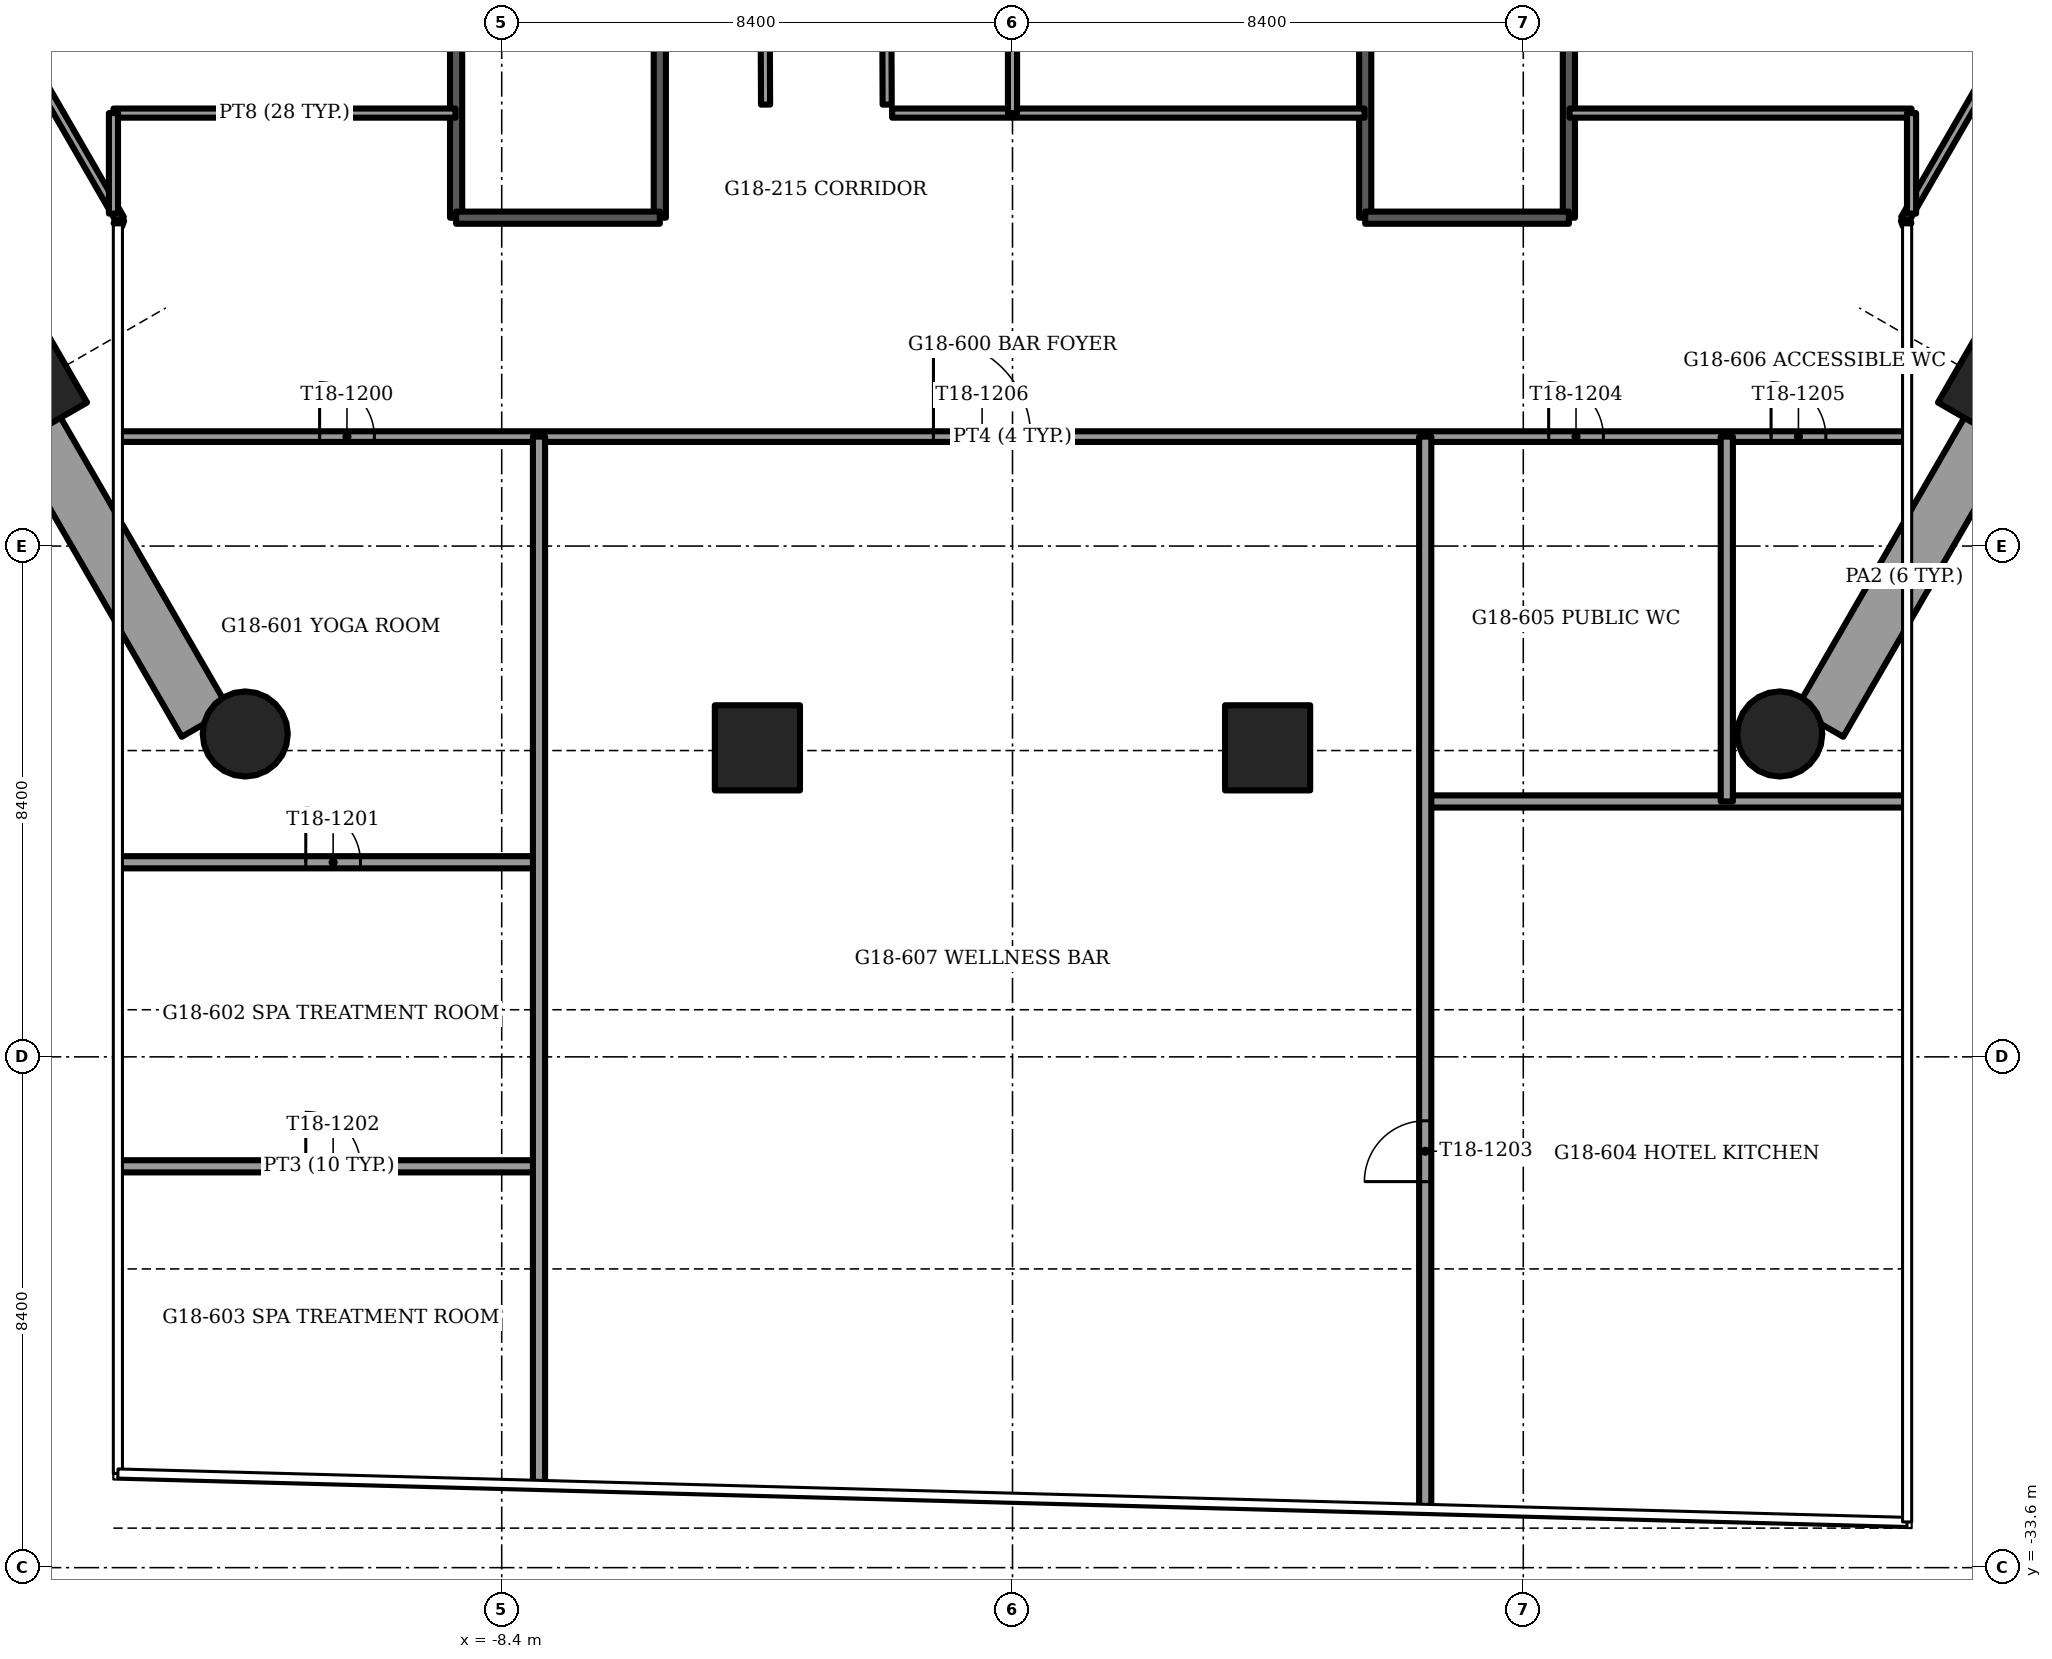
"""IFC4 building model, lengths in metres.
Left out: names, types, materials, properties, quantities, classifications, styles, units other than length and angle.
Written with IfcOpenShell. Run it as: python <this file> out.ifc"""

import sys

from ifc_helpers import new_model, si_unit, direction, frame, frame_2d, origin, origin_2d, place, context, subcontext, project, spatial, rectangle, circle, extrude, element, fill, save


model = new_model("IFC4")
c1 = context("Model", 3, precision=1e-05, world=origin(), true_north=direction((0.0, 1.0)))
c2 = subcontext(c1, "Body", "Model", "MODEL_VIEW")
j1 = project(units=[si_unit("LENGTHUNIT", "METRE"), si_unit("PLANEANGLEUNIT", "RADIAN")], contexts=[c1])
p1 = place(None, origin())
s1 = spatial("IfcSite", under=j1, at=p1, CompositionType="ELEMENT")
p2 = place(p1, origin())
s2 = spatial("IfcBuilding", under=s1, at=p2, CompositionType="ELEMENT")
p3 = place(p2, frame((0.0, 0.0, 73.0)))
s3 = spatial("IfcBuildingStorey", under=s2, at=p3, CompositionType="ELEMENT", Elevation=73.0)
for number, where, z_axis, x_axis in (
    (1, (-12.617, -19.89, -1.2), (0.0, 0.0, 1.0), (1.0, 0.0, 0.0)),
    (2, (12.617, -19.89, -1.2), (0.0, 0.0, 1.0), (1.0, 0.0, 0.0)),
):
    element("IfcColumn", number, at=place(p3, frame(where, z_axis=z_axis, x_axis=x_axis)), inside=s3, PredefinedType="COLUMN", context=c2, shape_type="SweptSolid", body=[
        extrude(circle(Radius=0.7, at=origin_2d()), origin(), (0.0, 0.0, 1.0), 3.75),
    ])
for number, where, z_axis, x_axis in (
    (3, (-16.175, -14.183, -1.2), (0.0, 0.0, 1.0), (-0.5, 0.866, 0.0)),
    (4, (-4.195, -20.118, -1.2), (0.0, 0.0, 1.0), (-1.0, 0.0, 0.0)),
    (5, (4.195, -20.118, -1.2), (0.0, 0.0, 1.0), (-1.0, 0.0, 0.0)),
    (6, (16.175, -14.183, -1.2), (0.0, 0.0, 1.0), (-0.5, -0.866, 0.0)),
):
    element("IfcColumn", number, at=place(p3, frame(where, z_axis=z_axis, x_axis=x_axis)), inside=s3, PredefinedType="COLUMN", context=c2, shape_type="SweptSolid", body=[
        extrude(rectangle(XDim=1.4, YDim=1.4, at=origin_2d()), origin(), (0.0, 0.0, 1.0), 3.75),
    ])
for number, where, z_axis, x_axis in (
    (7, (-16.057, -14.889, 0.0), (0.0, 0.0, 1.0), (0.5, -0.866, 0.0)),
    (8, (13.272, -19.712, 0.0), (0.0, 0.0, 1.0), (0.5, 0.866, 0.0)),
):
    element("IfcWall", number, at=place(p3, frame(where, z_axis=z_axis, x_axis=x_axis)), inside=s3, PredefinedType="PARAPET", context=c2, shape_type="SweptSolid", body=[
        extrude(rectangle(XDim=5.57, YDim=0.9, at=frame_2d((2.785, 0.0))), origin(), (0.0, 0.0, 1.0), 1.1),
    ])
p4 = place(p3, frame((-20.401, -1.514, 0.0), z_axis=(0.0, 0.0, 1.0), x_axis=(0.499991453095, -0.866030338286, 0.0)))
e9 = element("IfcWall", 9, at=p4, inside=s3, PredefinedType="SOLIDWALL", context=c2, shape_type="SweptSolid", body=[
    extrude(rectangle(XDim=11.444, YDim=0.15, at=frame_2d((5.722, 0.0))), origin(), (0.0, 0.0, 1.0), 3.45),
])
p5 = place(p4, frame((0.789, 0.0, 0.15)))
e10 = element("IfcOpeningElement", 10, at=p5, cuts=e9, PredefinedType="OPENING", context=c2, shape_type="SweptSolid", body=[
    extrude(rectangle(XDim=0.9, YDim=2.2, at=frame_2d((0.45, 1.1))), frame((0.0, 0.075, 0.0), z_axis=(0.0, -1.0, 0.0), x_axis=(1.0, 0.0, 0.0)), (0.0, 0.0, 1.0), 0.15),
])
p6 = place(p4, frame((2.889, 0.0, 0.15)))
e11 = element("IfcOpeningElement", 11, at=p6, cuts=e9, PredefinedType="OPENING", context=c2, shape_type="SweptSolid", body=[
    extrude(rectangle(XDim=1.5, YDim=2.2, at=frame_2d((0.75, 1.1))), frame((0.0, 0.075, 0.0), z_axis=(0.0, -1.0, 0.0), x_axis=(1.0, 0.0, 0.0)), (0.0, 0.0, 1.0), 0.15),
])
p7 = place(p4, frame((6.312, 0.0, 0.15)))
e12 = element("IfcOpeningElement", 12, at=p7, cuts=e9, PredefinedType="OPENING", context=c2, shape_type="SweptSolid", body=[
    extrude(rectangle(XDim=1.8, YDim=2.2, at=frame_2d((0.9, 1.1))), frame((0.0, 0.075, 0.0), z_axis=(0.0, -1.0, 0.0), x_axis=(1.0, 0.0, 0.0)), (0.0, 0.0, 1.0), 0.15),
])
p8 = place(p3, frame((14.679, -11.425, 0.0), z_axis=(0.0, 0.0, 1.0), x_axis=(0.499991453095, 0.866030338286, 0.0)))
e13 = element("IfcWall", 13, at=p8, inside=s3, PredefinedType="SOLIDWALL", context=c2, shape_type="SweptSolid", body=[
    extrude(rectangle(XDim=11.444, YDim=0.15, at=frame_2d((5.722, 0.0))), origin(), (0.0, 0.0, 1.0), 3.45),
])
p9 = place(p8, frame((3.632, 0.0, 0.15)))
e14 = element("IfcOpeningElement", 14, at=p9, cuts=e13, PredefinedType="OPENING", context=c2, shape_type="SweptSolid", body=[
    extrude(rectangle(XDim=1.5, YDim=2.2, at=frame_2d((0.75, 1.1))), frame((0.0, 0.075, 0.0), z_axis=(0.0, -1.0, 0.0), x_axis=(1.0, 0.0, 0.0)), (0.0, 0.0, 1.0), 0.15),
])
p10 = place(p8, frame((7.055, 0.0, 0.15)))
e15 = element("IfcOpeningElement", 15, at=p10, cuts=e13, PredefinedType="OPENING", context=c2, shape_type="SweptSolid", body=[
    extrude(rectangle(XDim=0.9, YDim=2.2, at=frame_2d((0.45, 1.1))), frame((0.0, 0.075, 0.0), z_axis=(0.0, -1.0, 0.0), x_axis=(1.0, 0.0, 0.0)), (0.0, 0.0, 1.0), 0.15),
])
for number, where, z_axis, x_axis in (
    (16, (-14.679, -11.425, 0.0), (0.0, 0.0, 1.0), (-0.339, -0.941, 0.0)),
    (17, (14.679, -11.425, 0.0), (0.0, 0.0, 1.0), (0.339, -0.941, 0.0)),
):
    element("IfcWall", number, at=place(p3, frame(where, z_axis=z_axis, x_axis=x_axis)), inside=s3, PredefinedType="SOLIDWALL", context=c2, shape_type="SweptSolid", body=[
        extrude(rectangle(XDim=0.098, YDim=0.15, at=frame_2d((0.049, 0.0))), origin(), (0.0, 0.0, 1.0), 3.45),
    ])
for number, where, z_axis, x_axis in (
    (18, (5.8, -3.7, -0.3), (0.0, 0.0, 1.0), (0.0, -1.0, 0.0)),
    (19, (9.15, -3.7, -0.3), (0.0, 0.0, 1.0), (0.0, -1.0, 0.0)),
):
    element("IfcWall", number, at=place(p3, frame(where, z_axis=z_axis, x_axis=x_axis)), inside=s3, PredefinedType="SOLIDWALL", context=c2, shape_type="SweptSolid", body=[
        extrude(rectangle(XDim=7.7, YDim=0.2, at=frame_2d((3.85, 0.0))), origin(), (0.0, 0.0, 1.0), 3.75),
    ])
p11 = place(p3, frame((5.8, -11.4, -0.3), z_axis=(0.0, 0.0, 1.0), x_axis=(1.0, 0.0, 0.0)))
e20 = element("IfcWall", 20, at=p11, inside=s3, PredefinedType="SOLIDWALL", context=c2, shape_type="SweptSolid", body=[
    extrude(rectangle(XDim=3.35, YDim=0.2, at=frame_2d((1.675, 0.0))), origin(), (0.0, 0.0, 1.0), 3.75),
])
for number, where, z_axis, x_axis in (
    (21, (-9.15, -3.7, -0.3), (0.0, 0.0, 1.0), (0.0, -1.0, 0.0)),
    (22, (-5.8, -3.7, -0.3), (0.0, 0.0, 1.0), (0.0, -1.0, 0.0)),
):
    element("IfcWall", number, at=place(p3, frame(where, z_axis=z_axis, x_axis=x_axis)), inside=s3, PredefinedType="SOLIDWALL", context=c2, shape_type="SweptSolid", body=[
        extrude(rectangle(XDim=7.7, YDim=0.2, at=frame_2d((3.85, 0.0))), origin(), (0.0, 0.0, 1.0), 3.75),
    ])
p12 = place(p3, frame((-9.15, -11.4, -0.3), z_axis=(0.0, 0.0, 1.0), x_axis=(1.0, 0.0, 0.0)))
e23 = element("IfcWall", 23, at=p12, inside=s3, PredefinedType="SOLIDWALL", context=c2, shape_type="SweptSolid", body=[
    extrude(rectangle(XDim=3.35, YDim=0.2, at=frame_2d((1.675, 0.0))), origin(), (0.0, 0.0, 1.0), 3.75),
])
p13 = place(p3, frame((-14.785, -9.68, 0.0), z_axis=(0.0, 0.0, 1.0), x_axis=(1.0, 0.0, 0.0)))
e24 = element("IfcWall", 24, at=p13, inside=s3, PredefinedType="PARTITIONING", context=c2, shape_type="SweptSolid", body=[
    extrude(rectangle(XDim=5.625, YDim=0.15, at=frame_2d((2.812, 0.0))), origin(), (0.0, 0.0, 1.0), 3.45),
])
p14 = place(p3, frame((-1.98, -9.68, 0.0), z_axis=(0.0, 0.0, 1.0), x_axis=(1.0, 0.0, 0.0)))
e25 = element("IfcWall", 25, at=p14, inside=s3, PredefinedType="PARTITIONING", context=c2, shape_type="SweptSolid", body=[
    extrude(rectangle(XDim=7.77, YDim=0.15, at=frame_2d((3.885, 0.0))), origin(), (0.0, 0.0, 1.0), 3.45),
])
p15 = place(p3, frame((9.16, -9.68, 0.0), z_axis=(0.0, 0.0, 1.0), x_axis=(1.0, 0.0, 0.0)))
e26 = element("IfcWall", 26, at=p15, inside=s3, PredefinedType="PARTITIONING", context=c2, shape_type="SweptSolid", body=[
    extrude(rectangle(XDim=5.625, YDim=0.15, at=frame_2d((2.812, 0.0))), origin(), (0.0, 0.0, 1.0), 3.45),
])
p16 = place(p3, frame((14.785, -11.332, 0.0), z_axis=(0.0, 0.0, 1.0), x_axis=(0.0, 1.0, 0.0)))
e27 = element("IfcWall", 27, at=p16, inside=s3, PredefinedType="PARTITIONING", context=c2, shape_type="SweptSolid", body=[
    extrude(rectangle(XDim=1.652, YDim=0.15, at=frame_2d((0.826, 0.0))), origin(), (0.0, 0.0, 1.0), 3.45),
])
p17 = place(p3, frame((0.0, -9.68, 0.0), z_axis=(0.0, 0.0, 1.0), x_axis=(0.0, 1.0, 0.0)))
e28 = element("IfcWall", 28, at=p17, inside=s3, PredefinedType="PARTITIONING", context=c2, shape_type="SweptSolid", body=[
    extrude(rectangle(XDim=5.98, YDim=0.15, at=frame_2d((2.99, 0.0))), origin(), (0.0, 0.0, 1.0), 3.45),
])
p18 = place(p3, frame((-14.785, -11.332, 0.0), z_axis=(0.0, 0.0, 1.0), x_axis=(0.0, 1.0, 0.0)))
e29 = element("IfcWall", 29, at=p18, inside=s3, PredefinedType="PARTITIONING", context=c2, shape_type="SweptSolid", body=[
    extrude(rectangle(XDim=1.652, YDim=0.15, at=frame_2d((0.826, 0.0))), origin(), (0.0, 0.0, 1.0), 3.45),
])
p19 = place(p3, frame((-2.061, -9.54, 0.0), z_axis=(0.0, 0.0, 1.0), x_axis=(-0.004096784315, 0.999991608144, 0.0)))
e30 = element("IfcWall", 30, at=p19, inside=s3, PredefinedType="PARTITIONING", context=c2, shape_type="SweptSolid", body=[
    extrude(rectangle(XDim=5.84, YDim=0.15, at=frame_2d((2.92, 0.0))), origin(), (0.0, 0.0, 1.0), 3.45),
])
p20 = place(p3, frame((-4.061, -9.54, 0.0), z_axis=(0.0, 0.0, 1.0), x_axis=(-0.004100383939, 0.99999159339, 0.0)))
e31 = element("IfcWall", 31, at=p20, inside=s3, PredefinedType="PARTITIONING", context=c2, shape_type="SweptSolid", body=[
    extrude(rectangle(XDim=5.835, YDim=0.15, at=frame_2d((2.917, 0.0))), origin(), (0.0, 0.0, 1.0), 3.45),
])
p21 = place(p3, frame((-14.693, -15.0, 0.0), z_axis=(0.0, 0.0, 1.0), x_axis=(1.0, 0.0, 0.0)))
e32 = element("IfcWall", 32, at=p21, inside=s3, PredefinedType="PARTITIONING", context=c2, shape_type="SweptSolid", body=[
    extrude(rectangle(XDim=29.386, YDim=0.175, at=frame_2d((14.693, 0.0))), origin(), (0.0, 0.0, 1.0), 3.45),
])
p22 = place(p21, frame((3.298, 0.0, 0.0)))
e33 = element("IfcOpeningElement", 33, at=p22, cuts=e32, PredefinedType="OPENING", context=c2, shape_type="SweptSolid", body=[
    extrude(rectangle(XDim=0.9, YDim=2.1, at=frame_2d((0.45, 1.05))), frame((0.0, 0.087, 0.0), z_axis=(0.0, -1.0, 0.0), x_axis=(1.0, 0.0, 0.0)), (0.0, 0.0, 1.0), 0.175),
])
p23 = place(p21, frame((23.51, 0.0, 0.0)))
e34 = element("IfcOpeningElement", 34, at=p23, cuts=e32, PredefinedType="OPENING", context=c2, shape_type="SweptSolid", body=[
    extrude(rectangle(XDim=0.9, YDim=2.1, at=frame_2d((0.45, 1.05))), frame((0.0, 0.087, 0.0), z_axis=(0.0, -1.0, 0.0), x_axis=(1.0, 0.0, 0.0)), (0.0, 0.0, 1.0), 0.175),
])
p24 = place(p21, frame((27.168, 0.0, 0.0)))
e35 = element("IfcOpeningElement", 35, at=p24, cuts=e32, PredefinedType="OPENING", context=c2, shape_type="SweptSolid", body=[
    extrude(rectangle(XDim=0.9, YDim=2.1, at=frame_2d((0.45, 1.05))), frame((0.0, 0.087, 0.0), z_axis=(0.0, -1.0, 0.0), x_axis=(1.0, 0.0, 0.0)), (0.0, 0.0, 1.0), 0.175),
])
p25 = place(p21, frame((13.393, 0.0, 0.0)))
e36 = element("IfcOpeningElement", 36, at=p25, cuts=e32, PredefinedType="OPENING", context=c2, shape_type="SweptSolid", body=[
    extrude(rectangle(XDim=1.6, YDim=2.1, at=frame_2d((0.8, 1.05))), frame((0.0, 0.087, 0.0), z_axis=(0.0, -1.0, 0.0), x_axis=(1.0, 0.0, 0.0)), (0.0, 0.0, 1.0), 0.175),
])
p26 = place(p3, frame((-14.693, -27.0, 0.0), z_axis=(0.0, 0.0, 1.0), x_axis=(1.0, 0.0, 0.0)))
e37 = element("IfcWall", 37, at=p26, inside=s3, PredefinedType="PARTITIONING", context=c2, shape_type="SweptSolid", body=[
    extrude(rectangle(XDim=6.906, YDim=0.2, at=frame_2d((3.453, 0.0))), origin(), (0.0, 0.0, 1.0), 3.45),
])
p27 = place(p26, frame((3.071, 0.0, 0.0)))
e38 = element("IfcOpeningElement", 38, at=p27, cuts=e37, PredefinedType="OPENING", context=c2, shape_type="SweptSolid", body=[
    extrude(rectangle(XDim=0.9, YDim=2.1, at=frame_2d((0.45, 1.05))), frame((0.0, 0.1, 0.0), z_axis=(0.0, -1.0, 0.0), x_axis=(1.0, 0.0, 0.0)), (0.0, 0.0, 1.0), 0.2),
])
p28 = place(p3, frame((-14.693, -22.0, 0.0), z_axis=(0.0, 0.0, 1.0), x_axis=(1.0, 0.0, 0.0)))
e39 = element("IfcWall", 39, at=p28, inside=s3, PredefinedType="PARTITIONING", context=c2, shape_type="SweptSolid", body=[
    extrude(rectangle(XDim=6.906, YDim=0.2, at=frame_2d((3.453, 0.0))), origin(), (0.0, 0.0, 1.0), 3.45),
])
p29 = place(p28, frame((3.071, 0.0, 0.0)))
e40 = element("IfcOpeningElement", 40, at=p29, cuts=e39, PredefinedType="OPENING", context=c2, shape_type="SweptSolid", body=[
    extrude(rectangle(XDim=0.9, YDim=2.1, at=frame_2d((0.45, 1.05))), frame((0.0, 0.1, 0.0), z_axis=(0.0, -1.0, 0.0), x_axis=(1.0, 0.0, 0.0)), (0.0, 0.0, 1.0), 0.2),
])
p30 = place(p3, frame((6.787, -21.0, 0.0), z_axis=(0.0, 0.0, 1.0), x_axis=(1.0, 0.0, 0.0)))
e41 = element("IfcWall", 41, at=p30, inside=s3, PredefinedType="PARTITIONING", context=c2, shape_type="SweptSolid", body=[
    extrude(rectangle(XDim=7.906, YDim=0.2, at=frame_2d((3.953, 0.0))), origin(), (0.0, 0.0, 1.0), 3.45),
])
p31 = place(p3, frame((-7.787, -32.22, 0.0), z_axis=(0.0, 0.0, 1.0), x_axis=(0.0, 1.0, 0.0)))
e42 = element("IfcWall", 42, at=p31, inside=s3, PredefinedType="PARTITIONING", context=c2, shape_type="SweptSolid", body=[
    extrude(rectangle(XDim=17.22, YDim=0.2, at=frame_2d((8.61, 0.0))), origin(), (0.0, 0.0, 1.0), 2.828),
])
p32 = place(p3, frame((6.787, -32.615, 0.0), z_axis=(0.0, 0.0, 1.0), x_axis=(0.0, 1.0, 0.0)))
e43 = element("IfcWall", 43, at=p32, inside=s3, PredefinedType="PARTITIONING", context=c2, shape_type="SweptSolid", body=[
    extrude(rectangle(XDim=17.615, YDim=0.2, at=frame_2d((8.807, 0.0))), origin(), (0.0, 0.0, 1.0), 2.828),
])
p33 = place(p32, frame((5.363, 0.0, 0.0)))
e44 = element("IfcOpeningElement", 44, at=p33, cuts=e43, PredefinedType="OPENING", context=c2, shape_type="SweptSolid", body=[
    extrude(rectangle(XDim=1.0, YDim=2.1, at=frame_2d((0.5, 1.05))), frame((0.0, 0.1, 0.0), z_axis=(0.0, -1.0, 0.0), x_axis=(1.0, 0.0, 0.0)), (0.0, 0.0, 1.0), 0.2),
])
p34 = place(p3, frame((11.747, -21.0, 0.0), z_axis=(0.0, 0.0, 1.0), x_axis=(0.0, 1.0, 0.0)))
e45 = element("IfcWall", 45, at=p34, inside=s3, PredefinedType="PARTITIONING", context=c2, shape_type="SweptSolid", body=[
    extrude(rectangle(XDim=6.0, YDim=0.2, at=frame_2d((3.0, 0.0))), origin(), (0.0, 0.0, 1.0), 2.828),
])
p35 = place(p22, origin())
e46 = element("IfcDoor", 46, at=p35, inside=s3, OperationType="SINGLE_SWING_RIGHT", PredefinedType="DOOR", context=c2, shape_type="SweptSolid", body=[
    extrude(rectangle(XDim=0.9, YDim=2.1, at=frame_2d((0.45, 1.05))), frame((0.0, 0.025, 0.0), z_axis=(0.0, -1.0, 0.0), x_axis=(1.0, 0.0, 0.0)), (0.0, 0.0, 1.0), 0.05),
])
fill(e33, e46)
p36 = place(p29, origin())
e47 = element("IfcDoor", 47, at=p36, inside=s3, OperationType="SINGLE_SWING_LEFT", PredefinedType="DOOR", context=c2, shape_type="SweptSolid", body=[
    extrude(rectangle(XDim=0.9, YDim=2.1, at=frame_2d((0.45, 1.05))), frame((0.0, 0.025, 0.0), z_axis=(0.0, -1.0, 0.0), x_axis=(1.0, 0.0, 0.0)), (0.0, 0.0, 1.0), 0.05),
])
fill(e40, e47)
p37 = place(p27, origin())
e48 = element("IfcDoor", 48, at=p37, inside=s3, OperationType="SINGLE_SWING_RIGHT", PredefinedType="DOOR", context=c2, shape_type="SweptSolid", body=[
    extrude(rectangle(XDim=0.9, YDim=2.1, at=frame_2d((0.45, 1.05))), frame((0.0, 0.025, 0.0), z_axis=(0.0, -1.0, 0.0), x_axis=(1.0, 0.0, 0.0)), (0.0, 0.0, 1.0), 0.05),
])
fill(e38, e48)
p38 = place(p33, origin())
e49 = element("IfcDoor", 49, at=p38, inside=s3, OperationType="SINGLE_SWING_LEFT", PredefinedType="DOOR", context=c2, shape_type="SweptSolid", body=[
    extrude(rectangle(XDim=1.0, YDim=2.1, at=frame_2d((0.5, 1.05))), frame((0.0, 0.025, 0.0), z_axis=(0.0, -1.0, 0.0), x_axis=(1.0, 0.0, 0.0)), (0.0, 0.0, 1.0), 0.05),
])
fill(e44, e49)
p39 = place(p23, origin())
e50 = element("IfcDoor", 50, at=p39, inside=s3, OperationType="SINGLE_SWING_RIGHT", PredefinedType="DOOR", context=c2, shape_type="SweptSolid", body=[
    extrude(rectangle(XDim=0.9, YDim=2.1, at=frame_2d((0.45, 1.05))), frame((0.0, 0.025, 0.0), z_axis=(0.0, -1.0, 0.0), x_axis=(1.0, 0.0, 0.0)), (0.0, 0.0, 1.0), 0.05),
])
fill(e34, e50)
p40 = place(p24, origin())
e51 = element("IfcDoor", 51, at=p40, inside=s3, OperationType="SINGLE_SWING_LEFT", PredefinedType="DOOR", context=c2, shape_type="SweptSolid", body=[
    extrude(rectangle(XDim=0.9, YDim=2.1, at=frame_2d((0.45, 1.05))), frame((0.0, 0.025, 0.0), z_axis=(0.0, -1.0, 0.0), x_axis=(1.0, 0.0, 0.0)), (0.0, 0.0, 1.0), 0.05),
])
fill(e35, e51)
p41 = place(p25, origin())
e52 = element("IfcDoor", 52, at=p41, inside=s3, OperationType="DOUBLE_DOOR_SINGLE_SWING", PredefinedType="DOOR", context=c2, shape_type="SweptSolid", body=[
    extrude(rectangle(XDim=1.6, YDim=2.1, at=frame_2d((0.8, 1.05))), frame((0.0, 0.025, 0.0), z_axis=(0.0, -1.0, 0.0), x_axis=(1.0, 0.0, 0.0)), (0.0, 0.0, 1.0), 0.05),
])
fill(e36, e52)
save(model, sys.argv[1])
